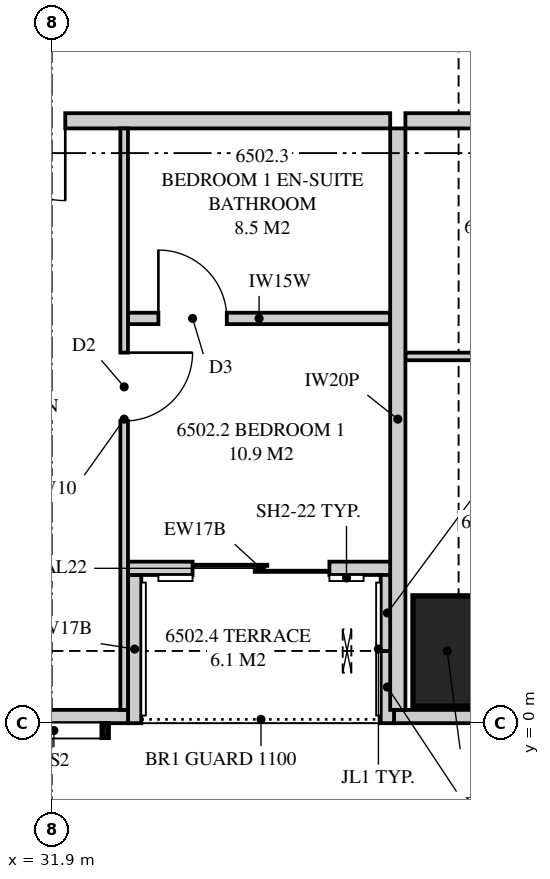
"""IFC4 building model, lengths in metres.
Left out: names, types, materials, properties, quantities, classifications, styles, units other than length and angle.
Written with IfcOpenShell. Run it as: python <this file> out.ifc"""

import sys

from ifc_helpers import new_model, si_unit, direction, frame, frame_2d, origin, origin_2d, place, context, subcontext, project, spatial, polyline, rectangle, outline, extrude, element, fill, save


model = new_model("IFC4")
c1 = context("Model", 3, precision=1e-05, world=origin(), true_north=direction((0.0, 1.0)))
c2 = subcontext(c1, "Body", "Model", "MODEL_VIEW")
j1 = project(units=[si_unit("LENGTHUNIT", "METRE"), si_unit("PLANEANGLEUNIT", "RADIAN")], contexts=[c1])
p1 = place(None, origin())
s1 = spatial("IfcSite", under=j1, at=p1, CompositionType="ELEMENT")
p2 = place(p1, origin())
s2 = spatial("IfcBuilding", under=s1, at=p2, CompositionType="ELEMENT")
p3 = place(p2, frame((0.0, 0.0, 238.95)))
s3 = spatial("IfcBuildingStorey", under=s2, at=p3, CompositionType="ELEMENT", Elevation=238.95)
p4 = place(p3, frame((37.25, 0.95, 0.0), z_axis=(0.0, 0.0, 1.0), x_axis=(0.0, 1.0, 0.0)))
e1 = element("IfcColumn", 1, at=p4, inside=s3, PredefinedType="COLUMN", context=c2, shape_type="SweptSolid", body=[
    extrude(rectangle(XDim=1.45, YDim=1.2, at=origin_2d()), origin(), (0.0, 0.0, 1.0), 3.5),
])
p5 = place(p3, frame((19.851, 0.087, 0.0), z_axis=(0.0, 0.0, 1.0), x_axis=(1.0, 0.0, 0.0)))
e2 = element("IfcWall", 2, at=p5, inside=s3, PredefinedType="SOLIDWALL", context=c2, shape_type="SweptSolid", body=[
    extrude(outline(polyline([(0.0, 0.0), (13.049, 0.0), (13.049, 2.3), (7.774, 2.3), (7.774, 3.26), (7.642, 3.26), (7.642, 2.3), (7.559, 2.3), (7.559, 3.26), (0.0, 3.26), (0.0, 0.0)])), frame((0.0, 0.087, 0.0), z_axis=(0.0, -1.0, 0.0), x_axis=(1.0, 0.0, 0.0)), (0.0, 0.0, 1.0), 0.175),
])
p6 = place(p5, frame((0.636, 0.0, 0.4)))
e3 = element("IfcOpeningElement", 3, at=p6, cuts=e2, PredefinedType="OPENING", context=c2, shape_type="SweptSolid", body=[
    extrude(rectangle(XDim=1.8, YDim=1.85, at=frame_2d((0.9, 0.925))), frame((0.0, 0.097, 0.0), z_axis=(0.0, -1.0, 0.0), x_axis=(1.0, 0.0, 0.0)), (0.0, 0.0, 1.0), 0.195),
])
p7 = place(p5, frame((4.049, 0.0, 0.4)))
e4 = element("IfcOpeningElement", 4, at=p7, cuts=e2, PredefinedType="OPENING", context=c2, shape_type="SweptSolid", body=[
    extrude(rectangle(XDim=1.8, YDim=1.85, at=frame_2d((0.9, 0.925))), frame((0.0, 0.097, 0.0), z_axis=(0.0, -1.0, 0.0), x_axis=(1.0, 0.0, 0.0)), (0.0, 0.0, 1.0), 0.195),
])
p8 = place(p5, frame((8.699, 0.0, 0.4)))
e5 = element("IfcOpeningElement", 5, at=p8, cuts=e2, PredefinedType="OPENING", context=c2, shape_type="SweptSolid", body=[
    extrude(rectangle(XDim=2.4, YDim=1.85, at=frame_2d((1.2, 0.925))), frame((0.0, 0.097, 0.0), z_axis=(0.0, -1.0, 0.0), x_axis=(1.0, 0.0, 0.0)), (0.0, 0.0, 1.0), 0.195),
])
p9 = place(p3, frame((36.4, 0.087, 0.0), z_axis=(0.0, 0.0, 1.0), x_axis=(1.0, 0.0, 0.0)))
e6 = element("IfcWall", 6, at=p9, inside=s3, PredefinedType="SOLIDWALL", context=c2, shape_type="SweptSolid", body=[
    extrude(outline(polyline([(0.0, 0.0), (17.049, 0.0), (17.049, 3.26), (10.69, 3.26), (10.69, 2.3), (10.606, 2.3), (10.606, 3.26), (10.475, 3.26), (10.475, 2.3), (0.0, 2.3), (0.0, 0.0)])), frame((0.0, 0.087, 0.0), z_axis=(0.0, -1.0, 0.0), x_axis=(1.0, 0.0, 0.0)), (0.0, 0.0, 1.0), 0.175),
])
p10 = place(p9, frame((1.76, 0.0, 0.4)))
e7 = element("IfcOpeningElement", 7, at=p10, cuts=e6, PredefinedType="OPENING", context=c2, shape_type="SweptSolid", body=[
    extrude(rectangle(XDim=2.4, YDim=1.85, at=frame_2d((1.2, 0.925))), frame((0.0, 0.097, 0.0), z_axis=(0.0, -1.0, 0.0), x_axis=(1.0, 0.0, 0.0)), (0.0, 0.0, 1.0), 0.195),
])
p11 = place(p9, frame((6.6, 0.0, 0.4)))
e8 = element("IfcOpeningElement", 8, at=p11, cuts=e6, PredefinedType="OPENING", context=c2, shape_type="SweptSolid", body=[
    extrude(rectangle(XDim=1.8, YDim=1.85, at=frame_2d((0.9, 0.925))), frame((0.0, 0.097, 0.0), z_axis=(0.0, -1.0, 0.0), x_axis=(1.0, 0.0, 0.0)), (0.0, 0.0, 1.0), 0.195),
])
p12 = place(p9, frame((11.357, 0.0, 0.4)))
e9 = element("IfcOpeningElement", 9, at=p12, cuts=e6, PredefinedType="OPENING", context=c2, shape_type="SweptSolid", body=[
    extrude(rectangle(XDim=1.8, YDim=1.85, at=frame_2d((0.9, 0.925))), frame((0.0, 0.097, 0.0), z_axis=(0.0, -1.0, 0.0), x_axis=(1.0, 0.0, 0.0)), (0.0, 0.0, 1.0), 0.195),
])
p13 = place(p9, frame((14.2, 0.0, 0.4)))
e10 = element("IfcOpeningElement", 10, at=p13, cuts=e6, PredefinedType="OPENING", context=c2, shape_type="SweptSolid", body=[
    extrude(rectangle(XDim=1.8, YDim=1.85, at=frame_2d((0.9, 0.925))), frame((0.0, 0.097, 0.0), z_axis=(0.0, -1.0, 0.0), x_axis=(1.0, 0.0, 0.0)), (0.0, 0.0, 1.0), 0.195),
])
p14 = place(p3, frame((32.9, 2.038, 0.0), z_axis=(0.0, 0.0, 1.0), x_axis=(1.0, 0.0, 0.0)))
e11 = element("IfcWall", 11, at=p14, inside=s3, PredefinedType="SOLIDWALL", context=c2, shape_type="SweptSolid", body=[
    extrude(outline(polyline([(0.0, 0.0), (3.5, 0.0), (3.5, 2.66), (3.15, 2.66), (3.15, 3.26), (0.0, 3.26), (0.0, 0.0)])), frame((0.0, 0.087, 0.0), z_axis=(0.0, -1.0, 0.0), x_axis=(1.0, 0.0, 0.0)), (0.0, 0.0, 1.0), 0.175),
])
p15 = place(p14, frame((0.85, 0.0, 0.0)))
e12 = element("IfcOpeningElement", 12, at=p15, cuts=e11, PredefinedType="OPENING", context=c2, shape_type="SweptSolid", body=[
    extrude(rectangle(XDim=1.8, YDim=2.25, at=frame_2d((0.9, 1.125))), frame((0.0, 0.097, 0.0), z_axis=(0.0, -1.0, 0.0), x_axis=(1.0, 0.0, 0.0)), (0.0, 0.0, 1.0), 0.195),
])
p16 = place(p3, frame((32.988, 0.0, 0.0), z_axis=(0.0, 0.0, 1.0), x_axis=(0.0, 1.0, 0.0)))
e13 = element("IfcWall", 13, at=p16, inside=s3, PredefinedType="SOLIDWALL", context=c2, shape_type="SweptSolid", body=[
    extrude(outline(polyline([(0.0, 0.0), (1.95, 0.0), (1.95, 3.26), (1.75, 3.26), (1.75, 2.3), (0.15, 2.3), (0.15, 3.26), (0.0, 3.26), (0.0, 0.0)])), frame((0.0, 0.087, 0.0), z_axis=(0.0, -1.0, 0.0), x_axis=(1.0, 0.0, 0.0)), (0.0, 0.0, 1.0), 0.175),
])
p17 = place(p3, frame((36.312, 0.0, 0.0), z_axis=(0.0, 0.0, 1.0), x_axis=(0.0, 1.0, 0.0)))
e14 = element("IfcWall", 14, at=p17, inside=s3, PredefinedType="SOLIDWALL", context=c2, shape_type="SweptSolid", body=[
    extrude(outline(polyline([(0.0, 0.0), (0.95, 0.0), (0.95, 2.3), (0.15, 2.3), (0.15, 3.26), (0.0, 3.26), (0.0, 0.0)])), frame((0.0, 0.087, 0.0), z_axis=(0.0, -1.0, 0.0), x_axis=(1.0, 0.0, 0.0)), (0.0, 0.0, 1.0), 0.175),
])
p18 = place(p3, frame((36.312, 0.95, 0.0), z_axis=(0.0, 0.0, 1.0), x_axis=(0.0, 1.0, 0.0)))
e15 = element("IfcWall", 15, at=p18, inside=s3, PredefinedType="SOLIDWALL", context=c2, shape_type="SweptSolid", body=[
    extrude(outline(polyline([(0.0, 0.0), (1.0, 0.0), (1.0, 2.66), (0.8, 2.66), (0.8, 2.3), (0.0, 2.3), (0.0, 0.0)])), frame((0.0, 0.087, 0.0), z_axis=(0.0, -1.0, 0.0), x_axis=(1.0, 0.0, 0.0)), (0.0, 0.0, 1.0), 0.175),
])
p19 = place(p3, frame((36.45, 0.175, 0.0), z_axis=(0.0, 0.0, 1.0), x_axis=(0.0, 1.0, 0.0)))
e16 = element("IfcWall", 16, at=p19, inside=s3, PredefinedType="PARTITIONING", context=c2, shape_type="SweptSolid", body=[
    extrude(outline(polyline([(0.0, 0.0), (7.65, 0.0), (7.65, 3.26), (7.65, 2.66), (1.685, 2.66), (1.685, 2.3), (0.0, 2.3), (0.0, 3.26), (0.0, 0.0)])), frame((0.0, 0.1, 0.0), z_axis=(0.0, -1.0, 0.0), x_axis=(1.0, 0.0, 0.0)), (0.0, 0.0, 1.0), 0.2),
])
p20 = place(p3, frame((26.7, 7.925, 0.0), z_axis=(0.0, 0.0, 1.0), x_axis=(1.0, 0.0, 0.0)))
e17 = element("IfcWall", 17, at=p20, inside=s3, PredefinedType="PARTITIONING", context=c2, shape_type="SweptSolid", body=[
    extrude(outline(polyline([(0.0, 0.0), (9.65, 0.0), (9.65, 3.26), (9.65, 2.66), (9.24, 2.66), (9.24, 3.26), (2.235, 3.26), (2.235, 2.66), (0.0, 2.66), (0.0, 3.26), (0.0, 0.0)])), frame((0.0, 0.1, 0.0), z_axis=(0.0, -1.0, 0.0), x_axis=(1.0, 0.0, 0.0)), (0.0, 0.0, 1.0), 0.2),
])
p21 = place(p20, frame((4.325, 0.0, 0.0)))
e18 = element("IfcOpeningElement", 18, at=p21, cuts=e17, PredefinedType="OPENING", context=c2, shape_type="SweptSolid", body=[
    extrude(rectangle(XDim=1.05, YDim=2.2, at=frame_2d((0.525, 1.1))), frame((0.0, 0.11, 0.0), z_axis=(0.0, -1.0, 0.0), x_axis=(1.0, 0.0, 0.0)), (0.0, 0.0, 1.0), 0.22),
])
p22 = place(p3, frame((32.85, 0.175, 0.0), z_axis=(0.0, 0.0, 1.0), x_axis=(0.0, 1.0, 0.0)))
e19 = element("IfcWall", 19, at=p22, inside=s3, PredefinedType="PARTITIONING", context=c2, shape_type="SweptSolid", body=[
    extrude(outline(polyline([(0.0, 0.0), (7.65, 0.0), (7.65, 3.26), (1.635, 3.26), (1.635, 2.3), (0.0, 2.3), (0.0, 3.26), (0.0, 0.0)])), frame((0.0, 0.05, 0.0), z_axis=(0.0, -1.0, 0.0), x_axis=(1.0, 0.0, 0.0)), (0.0, 0.0, 1.0), 0.1),
])
p23 = place(p22, frame((3.8, 0.0, 0.0)))
e20 = element("IfcOpeningElement", 20, at=p23, cuts=e19, PredefinedType="OPENING", context=c2, shape_type="SweptSolid", body=[
    extrude(rectangle(XDim=0.9, YDim=2.1, at=frame_2d((0.45, 1.05))), frame((0.0, 0.06, 0.0), z_axis=(0.0, -1.0, 0.0), x_axis=(1.0, 0.0, 0.0)), (0.0, 0.0, 1.0), 0.12),
])
p24 = place(p3, frame((32.9, 5.325, 0.0), z_axis=(0.0, 0.0, 1.0), x_axis=(1.0, 0.0, 0.0)))
e21 = element("IfcWall", 21, at=p24, inside=s3, PredefinedType="PLUMBINGWALL", context=c2, shape_type="SweptSolid", body=[
    extrude(outline(polyline([(0.0, 0.0), (3.45, 0.0), (3.45, 3.26), (3.45, 2.66), (3.065, 2.66), (3.065, 3.26), (0.0, 3.26), (0.0, 0.0)])), frame((0.0, 0.075, 0.0), z_axis=(0.0, -1.0, 0.0), x_axis=(1.0, 0.0, 0.0)), (0.0, 0.0, 1.0), 0.15),
])
p25 = place(p24, frame((0.4, 0.0, 0.0)))
e22 = element("IfcOpeningElement", 22, at=p25, cuts=e21, PredefinedType="OPENING", context=c2, shape_type="SweptSolid", body=[
    extrude(rectangle(XDim=0.9, YDim=2.1, at=frame_2d((0.45, 1.05))), frame((0.0, 0.085, 0.0), z_axis=(0.0, -1.0, 0.0), x_axis=(1.0, 0.0, 0.0)), (0.0, 0.0, 1.0), 0.17),
])
p26 = place(p3, frame((36.55, 7.925, 0.0), z_axis=(0.0, 0.0, 1.0), x_axis=(1.0, 0.0, 0.0)))
e23 = element("IfcWall", 23, at=p26, inside=s3, PredefinedType="PARTITIONING", context=c2, shape_type="SweptSolid", body=[
    extrude(outline(polyline([(0.0, 0.0), (9.325, 0.0), (9.325, 3.26), (9.325, 2.66), (9.015, 2.66), (9.015, 3.26), (2.01, 3.26), (2.01, 2.66), (0.0, 2.66), (0.0, 3.26), (0.0, 0.0)])), frame((0.0, 0.1, 0.0), z_axis=(0.0, -1.0, 0.0), x_axis=(1.0, 0.0, 0.0)), (0.0, 0.0, 1.0), 0.2),
])
p27 = place(p26, frame((4.15, 0.0, 0.0)))
e24 = element("IfcOpeningElement", 24, at=p27, cuts=e23, PredefinedType="OPENING", context=c2, shape_type="SweptSolid", body=[
    extrude(rectangle(XDim=1.05, YDim=2.2, at=frame_2d((0.525, 1.1))), frame((0.0, 0.11, 0.0), z_axis=(0.0, -1.0, 0.0), x_axis=(1.0, 0.0, 0.0)), (0.0, 0.0, 1.0), 0.22),
])
p28 = place(p3, frame((36.55, 4.825, 0.0), z_axis=(0.0, 0.0, 1.0), x_axis=(1.0, 0.0, 0.0)))
e25 = element("IfcWall", 25, at=p28, inside=s3, PredefinedType="PARTITIONING", context=c2, shape_type="SweptSolid", body=[
    extrude(outline(polyline([(0.0, 0.0), (3.55, 0.0), (3.55, 3.26), (1.96, 3.26), (1.96, 2.66), (0.0, 2.66), (0.0, 3.26), (0.0, 0.0)])), frame((0.0, 0.05, 0.0), z_axis=(0.0, -1.0, 0.0), x_axis=(1.0, 0.0, 0.0)), (0.0, 0.0, 1.0), 0.1),
])
p29 = place(p28, frame((1.35, 0.0, 0.0)))
e26 = element("IfcOpeningElement", 26, at=p29, cuts=e25, PredefinedType="OPENING", context=c2, shape_type="SweptSolid", body=[
    extrude(rectangle(XDim=0.9, YDim=2.1, at=frame_2d((0.45, 1.05))), frame((0.0, 0.06, 0.0), z_axis=(0.0, -1.0, 0.0), x_axis=(1.0, 0.0, 0.0)), (0.0, 0.0, 1.0), 0.12),
])
p30 = place(p15, origin())
e27 = element("IfcDoor", 27, at=p30, inside=s3, OperationType="SLIDING_TO_LEFT", PredefinedType="DOOR", context=c2, shape_type="SweptSolid", body=[
    extrude(rectangle(XDim=1.8, YDim=2.25, at=frame_2d((0.9, 1.125))), frame((0.0, 0.025, 0.0), z_axis=(0.0, -1.0, 0.0), x_axis=(1.0, 0.0, 0.0)), (0.0, 0.0, 1.0), 0.05),
])
fill(e12, e27)
p31 = place(p21, frame((1.05, 0.0, 0.0), z_axis=(0.0, 0.0, 1.0), x_axis=(-1.0, 0.0, 0.0)))
e28 = element("IfcDoor", 28, at=p31, inside=s3, OperationType="SINGLE_SWING_LEFT", PredefinedType="DOOR", context=c2, shape_type="SweptSolid", body=[
    extrude(rectangle(XDim=1.05, YDim=2.2, at=frame_2d((0.525, 1.1))), frame((0.0, 0.025, 0.0), z_axis=(0.0, -1.0, 0.0), x_axis=(1.0, 0.0, 0.0)), (0.0, 0.0, 1.0), 0.05),
])
fill(e18, e28)
p32 = place(p23, frame((0.9, 0.0, 0.0), z_axis=(0.0, 0.0, 1.0), x_axis=(-1.0, 0.0, 0.0)))
e29 = element("IfcDoor", 29, at=p32, inside=s3, OperationType="SINGLE_SWING_LEFT", PredefinedType="DOOR", context=c2, shape_type="SweptSolid", body=[
    extrude(rectangle(XDim=0.9, YDim=2.1, at=frame_2d((0.45, 1.05))), frame((0.0, 0.025, 0.0), z_axis=(0.0, -1.0, 0.0), x_axis=(1.0, 0.0, 0.0)), (0.0, 0.0, 1.0), 0.05),
])
fill(e20, e29)
p33 = place(p25, origin())
e30 = element("IfcDoor", 30, at=p33, inside=s3, OperationType="SINGLE_SWING_LEFT", PredefinedType="DOOR", context=c2, shape_type="SweptSolid", body=[
    extrude(rectangle(XDim=0.9, YDim=2.1, at=frame_2d((0.45, 1.05))), frame((0.0, 0.025, 0.0), z_axis=(0.0, -1.0, 0.0), x_axis=(1.0, 0.0, 0.0)), (0.0, 0.0, 1.0), 0.05),
])
fill(e22, e30)
save(model, sys.argv[1])
